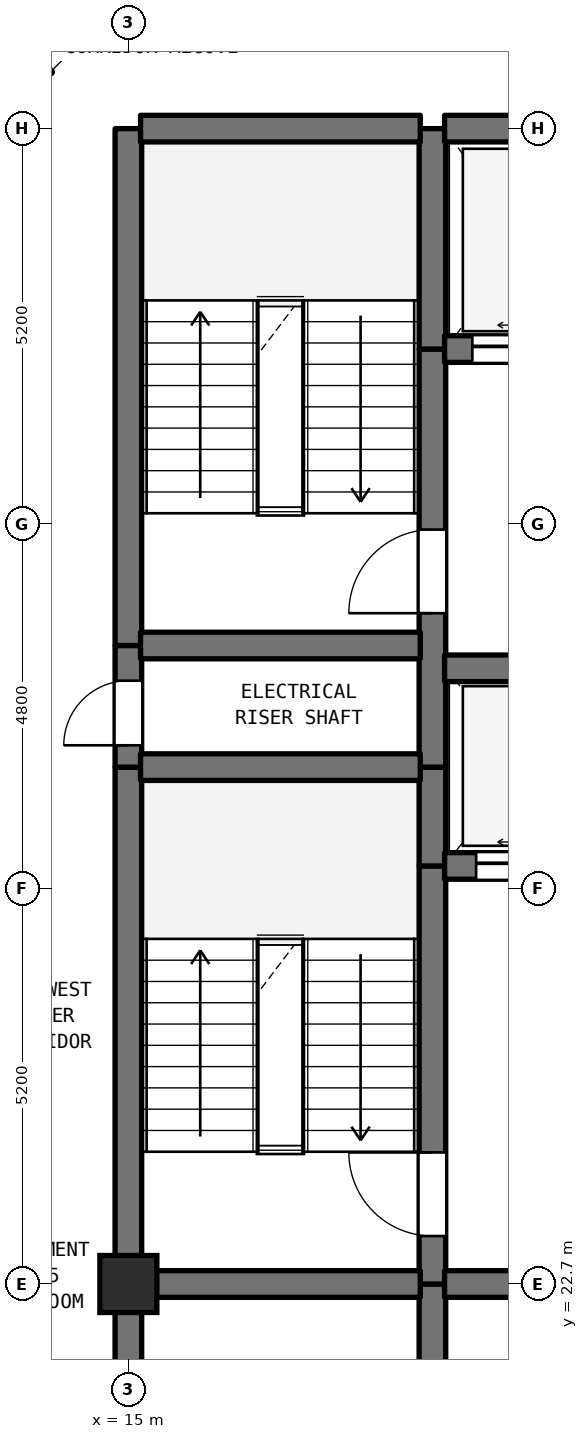
"""IFC4 building model, lengths in metres.
Left out: names, types, materials, properties, quantities, classifications, styles, units other than length and angle.
Written with IfcOpenShell. Run it as: python <this file> out.ifc"""

import sys

from ifc_helpers import new_model, si_unit, direction, frame, frame_2d, origin, origin_2d, place, context, subcontext, project, spatial, rectangle, extrude, element, fill, save


model = new_model("IFC4")
c1 = context("Model", 3, precision=1e-05, world=origin(), true_north=direction((0.0, 1.0)))
c2 = subcontext(c1, "Body", "Model", "MODEL_VIEW")
j1 = project(units=[si_unit("LENGTHUNIT", "METRE"), si_unit("PLANEANGLEUNIT", "RADIAN")], contexts=[c1])
p1 = place(None, origin())
s1 = spatial("IfcSite", under=j1, at=p1, CompositionType="ELEMENT")
p2 = place(p1, origin())
s2 = spatial("IfcBuilding", under=s1, at=p2, CompositionType="ELEMENT")
p3 = place(p2, frame((0.0, 0.0, 254.7)))
s3 = spatial("IfcBuildingStorey", under=s2, at=p3, CompositionType="ELEMENT", Elevation=254.7)
p4 = place(p3, frame((15.0, 22.7, 0.0), z_axis=(0.0, 0.0, 1.0), x_axis=(1.0, 0.0, 0.0)))
e1 = element("IfcColumn", 1, at=p4, inside=s3, PredefinedType="COLUMN", context=c2, shape_type="SweptSolid", body=[
    extrude(rectangle(XDim=0.75, YDim=0.75, at=origin_2d()), origin(), (0.0, 0.0, 1.0), 3.7),
])
p5 = place(p3, frame((15.0, 19.5, 0.0), z_axis=(0.0, 0.0, 1.0), x_axis=(0.0, 1.0, 0.0)))
e2 = element("IfcWall", 2, at=p5, inside=s3, PredefinedType="SHEAR", context=c2, shape_type="SweptSolid", body=[
    extrude(rectangle(XDim=3.2, YDim=0.35, at=frame_2d((1.6, 0.0))), origin(), (0.0, 0.0, 1.0), 3.39),
])
p6 = place(p3, frame((15.0, 22.7, 0.0), z_axis=(0.0, 0.0, 1.0), x_axis=(0.0, 1.0, 0.0)))
e3 = element("IfcWall", 3, at=p6, inside=s3, PredefinedType="SHEAR", context=c2, shape_type="SweptSolid", body=[
    extrude(rectangle(XDim=6.8, YDim=0.35, at=frame_2d((3.4, 0.0))), origin(), (0.0, 0.0, 1.0), 3.39),
])
p7 = place(p3, frame((15.0, 29.5, 0.0), z_axis=(0.0, 0.0, 1.0), x_axis=(0.0, 1.0, 0.0)))
e4 = element("IfcWall", 4, at=p7, inside=s3, PredefinedType="SHEAR", context=c2, shape_type="SweptSolid", body=[
    extrude(rectangle(XDim=1.6, YDim=0.35, at=frame_2d((0.8, 0.0))), origin(), (0.0, 0.0, 1.0), 3.39),
])
p8 = place(p7, frame((0.287, 0.0, 0.0)))
e5 = element("IfcOpeningElement", 5, at=p8, cuts=e4, PredefinedType="OPENING", context=c2, shape_type="SweptSolid", body=[
    extrude(rectangle(XDim=0.85, YDim=2.1, at=frame_2d((0.425, 1.05))), frame((0.0, 0.185, 0.0), z_axis=(0.0, -1.0, 0.0), x_axis=(1.0, 0.0, 0.0)), (0.0, 0.0, 1.0), 0.37),
])
p9 = place(p3, frame((15.0, 31.1, 0.0), z_axis=(0.0, 0.0, 1.0), x_axis=(0.0, 1.0, 0.0)))
e6 = element("IfcWall", 6, at=p9, inside=s3, PredefinedType="SHEAR", context=c2, shape_type="SweptSolid", body=[
    extrude(rectangle(XDim=6.8, YDim=0.35, at=frame_2d((3.4, 0.0))), origin(), (0.0, 0.0, 1.0), 3.39),
])
p10 = place(p3, frame((19.0, 19.5, 0.0), z_axis=(0.0, 0.0, 1.0), x_axis=(0.0, 1.0, 0.0)))
e7 = element("IfcWall", 7, at=p10, inside=s3, PredefinedType="SHEAR", context=c2, shape_type="SweptSolid", body=[
    extrude(rectangle(XDim=3.2, YDim=0.35, at=frame_2d((1.6, 0.0))), origin(), (0.0, 0.0, 1.0), 3.39),
])
p11 = place(p3, frame((19.0, 22.7, 0.0), z_axis=(0.0, 0.0, 1.0), x_axis=(0.0, 1.0, 0.0)))
e8 = element("IfcWall", 8, at=p11, inside=s3, PredefinedType="SHEAR", context=c2, shape_type="SweptSolid", body=[
    extrude(rectangle(XDim=5.5, YDim=0.35, at=frame_2d((2.75, 0.0))), origin(), (0.0, 0.0, 1.0), 3.39),
])
p12 = place(p11, frame((0.631, 0.0, 0.0)))
e9 = element("IfcOpeningElement", 9, at=p12, cuts=e8, PredefinedType="OPENING", context=c2, shape_type="SweptSolid", body=[
    extrude(rectangle(XDim=1.1, YDim=2.15, at=frame_2d((0.55, 1.075))), frame((0.0, 0.185, 0.0), z_axis=(0.0, -1.0, 0.0), x_axis=(1.0, 0.0, 0.0)), (0.0, 0.0, 1.0), 0.37),
])
p13 = place(p3, frame((19.0, 28.2, 0.0), z_axis=(0.0, 0.0, 1.0), x_axis=(0.0, 1.0, 0.0)))
e10 = element("IfcWall", 10, at=p13, inside=s3, PredefinedType="SHEAR", context=c2, shape_type="SweptSolid", body=[
    extrude(rectangle(XDim=1.3, YDim=0.35, at=frame_2d((0.65, 0.0))), origin(), (0.0, 0.0, 1.0), 3.39),
])
p14 = place(p3, frame((19.0, 29.5, 0.0), z_axis=(0.0, 0.0, 1.0), x_axis=(0.0, 1.0, 0.0)))
e11 = element("IfcWall", 11, at=p14, inside=s3, PredefinedType="SHEAR", context=c2, shape_type="SweptSolid", body=[
    extrude(rectangle(XDim=5.5, YDim=0.35, at=frame_2d((2.75, 0.0))), origin(), (0.0, 0.0, 1.0), 3.39),
])
p15 = place(p14, frame((2.025, 0.0, 0.0)))
e12 = element("IfcOpeningElement", 12, at=p15, cuts=e11, PredefinedType="OPENING", context=c2, shape_type="SweptSolid", body=[
    extrude(rectangle(XDim=1.1, YDim=2.15, at=frame_2d((0.55, 1.075))), frame((0.0, 0.185, 0.0), z_axis=(0.0, -1.0, 0.0), x_axis=(1.0, 0.0, 0.0)), (0.0, 0.0, 1.0), 0.37),
])
p16 = place(p3, frame((19.0, 35.0, 0.0), z_axis=(0.0, 0.0, 1.0), x_axis=(0.0, 1.0, 0.0)))
e13 = element("IfcWall", 13, at=p16, inside=s3, PredefinedType="SHEAR", context=c2, shape_type="SweptSolid", body=[
    extrude(rectangle(XDim=2.9, YDim=0.35, at=frame_2d((1.45, 0.0))), origin(), (0.0, 0.0, 1.0), 3.39),
])
p17 = place(p3, frame((15.16, 22.7, 0.0), z_axis=(0.0, 0.0, 1.0), x_axis=(1.0, 0.0, 0.0)))
e14 = element("IfcWall", 14, at=p17, inside=s3, PredefinedType="SHEAR", context=c2, shape_type="SweptSolid", body=[
    extrude(rectangle(XDim=3.68, YDim=0.35, at=frame_2d((1.84, 0.0))), origin(), (0.0, 0.0, 1.0), 3.39),
])
p18 = place(p3, frame((19.16, 22.7, 0.0), z_axis=(0.0, 0.0, 1.0), x_axis=(1.0, 0.0, 0.0)))
e15 = element("IfcWall", 15, at=p18, inside=s3, PredefinedType="SHEAR", context=c2, shape_type="SweptSolid", body=[
    extrude(rectangle(XDim=4.48, YDim=0.35, at=frame_2d((2.24, 0.0))), origin(), (0.0, 0.0, 1.0), 3.39),
])
p19 = place(p18, frame((1.64, 0.0, 0.0)))
e16 = element("IfcOpeningElement", 16, at=p19, cuts=e15, PredefinedType="OPENING", context=c2, shape_type="SweptSolid", body=[
    extrude(rectangle(XDim=1.2, YDim=2.2, at=frame_2d((0.6, 1.1))), frame((0.0, 0.185, 0.0), z_axis=(0.0, -1.0, 0.0), x_axis=(1.0, 0.0, 0.0)), (0.0, 0.0, 1.0), 0.37),
])
p20 = place(p3, frame((19.16, 28.2, 0.0), z_axis=(0.0, 0.0, 1.0), x_axis=(1.0, 0.0, 0.0)))
e17 = element("IfcWall", 17, at=p20, inside=s3, PredefinedType="SHEAR", context=c2, shape_type="SweptSolid", body=[
    extrude(rectangle(XDim=4.48, YDim=0.35, at=frame_2d((2.24, 0.0))), origin(), (0.0, 0.0, 1.0), 3.39),
])
p21 = place(p20, frame((0.415, 0.0, 0.0)))
e18 = element("IfcOpeningElement", 18, at=p21, cuts=e17, PredefinedType="OPENING", context=c2, shape_type="SweptSolid", body=[
    extrude(rectangle(XDim=1.25, YDim=2.2, at=frame_2d((0.625, 1.1))), frame((0.0, 0.185, 0.0), z_axis=(0.0, -1.0, 0.0), x_axis=(1.0, 0.0, 0.0)), (0.0, 0.0, 1.0), 0.37),
])
p22 = place(p20, frame((2.815, 0.0, 0.0)))
e19 = element("IfcOpeningElement", 19, at=p22, cuts=e17, PredefinedType="OPENING", context=c2, shape_type="SweptSolid", body=[
    extrude(rectangle(XDim=1.25, YDim=2.2, at=frame_2d((0.625, 1.1))), frame((0.0, 0.185, 0.0), z_axis=(0.0, -1.0, 0.0), x_axis=(1.0, 0.0, 0.0)), (0.0, 0.0, 1.0), 0.37),
])
p23 = place(p3, frame((15.16, 29.5, 0.0), z_axis=(0.0, 0.0, 1.0), x_axis=(1.0, 0.0, 0.0)))
e20 = element("IfcWall", 20, at=p23, inside=s3, PredefinedType="SHEAR", context=c2, shape_type="SweptSolid", body=[
    extrude(rectangle(XDim=3.68, YDim=0.35, at=frame_2d((1.84, 0.0))), origin(), (0.0, 0.0, 1.0), 3.39),
])
p24 = place(p3, frame((19.16, 30.8, 0.0), z_axis=(0.0, 0.0, 1.0), x_axis=(1.0, 0.0, 0.0)))
e21 = element("IfcWall", 21, at=p24, inside=s3, PredefinedType="SHEAR", context=c2, shape_type="SweptSolid", body=[
    extrude(rectangle(XDim=4.48, YDim=0.35, at=frame_2d((2.24, 0.0))), origin(), (0.0, 0.0, 1.0), 3.39),
])
p25 = place(p3, frame((15.16, 31.1, 0.0), z_axis=(0.0, 0.0, 1.0), x_axis=(1.0, 0.0, 0.0)))
e22 = element("IfcWall", 22, at=p25, inside=s3, PredefinedType="SHEAR", context=c2, shape_type="SweptSolid", body=[
    extrude(rectangle(XDim=3.68, YDim=0.35, at=frame_2d((1.84, 0.0))), origin(), (0.0, 0.0, 1.0), 3.39),
])
p26 = place(p3, frame((19.16, 35.0, 0.0), z_axis=(0.0, 0.0, 1.0), x_axis=(1.0, 0.0, 0.0)))
e23 = element("IfcWall", 23, at=p26, inside=s3, PredefinedType="SHEAR", context=c2, shape_type="SweptSolid", body=[
    extrude(rectangle(XDim=4.48, YDim=0.35, at=frame_2d((2.24, 0.0))), origin(), (0.0, 0.0, 1.0), 3.39),
])
p27 = place(p26, frame((0.365, 0.0, 0.0)))
e24 = element("IfcOpeningElement", 24, at=p27, cuts=e23, PredefinedType="OPENING", context=c2, shape_type="SweptSolid", body=[
    extrude(rectangle(XDim=1.35, YDim=2.2, at=frame_2d((0.675, 1.1))), frame((0.0, 0.185, 0.0), z_axis=(0.0, -1.0, 0.0), x_axis=(1.0, 0.0, 0.0)), (0.0, 0.0, 1.0), 0.37),
])
p28 = place(p26, frame((2.765, 0.0, 0.0)))
e25 = element("IfcOpeningElement", 25, at=p28, cuts=e23, PredefinedType="OPENING", context=c2, shape_type="SweptSolid", body=[
    extrude(rectangle(XDim=1.35, YDim=2.2, at=frame_2d((0.675, 1.1))), frame((0.0, 0.185, 0.0), z_axis=(0.0, -1.0, 0.0), x_axis=(1.0, 0.0, 0.0)), (0.0, 0.0, 1.0), 0.37),
])
p29 = place(p3, frame((15.16, 37.9, 0.0), z_axis=(0.0, 0.0, 1.0), x_axis=(1.0, 0.0, 0.0)))
e26 = element("IfcWall", 26, at=p29, inside=s3, PredefinedType="SHEAR", context=c2, shape_type="SweptSolid", body=[
    extrude(rectangle(XDim=3.68, YDim=0.35, at=frame_2d((1.84, 0.0))), origin(), (0.0, 0.0, 1.0), 3.39),
])
p30 = place(p3, frame((19.16, 37.9, 0.0), z_axis=(0.0, 0.0, 1.0), x_axis=(1.0, 0.0, 0.0)))
e27 = element("IfcWall", 27, at=p30, inside=s3, PredefinedType="SHEAR", context=c2, shape_type="SweptSolid", body=[
    extrude(rectangle(XDim=4.48, YDim=0.35, at=frame_2d((2.24, 0.0))), origin(), (0.0, 0.0, 1.0), 3.39),
])
p31 = place(p8, origin())
e28 = element("IfcDoor", 28, at=p31, inside=s3, OperationType="SINGLE_SWING_LEFT", PredefinedType="DOOR", context=c2, shape_type="SweptSolid", body=[
    extrude(rectangle(XDim=0.85, YDim=2.1, at=frame_2d((0.425, 1.05))), frame((0.0, 0.025, 0.0), z_axis=(0.0, -1.0, 0.0), x_axis=(1.0, 0.0, 0.0)), (0.0, 0.0, 1.0), 0.05),
])
fill(e5, e28)
p32 = place(p12, origin())
e29 = element("IfcDoor", 29, at=p32, inside=s3, OperationType="SINGLE_SWING_RIGHT", PredefinedType="DOOR", context=c2, shape_type="SweptSolid", body=[
    extrude(rectangle(XDim=1.1, YDim=2.15, at=frame_2d((0.55, 1.075))), frame((0.0, 0.025, 0.0), z_axis=(0.0, -1.0, 0.0), x_axis=(1.0, 0.0, 0.0)), (0.0, 0.0, 1.0), 0.05),
])
fill(e9, e29)
p33 = place(p15, origin())
e30 = element("IfcDoor", 30, at=p33, inside=s3, OperationType="SINGLE_SWING_LEFT", PredefinedType="DOOR", context=c2, shape_type="SweptSolid", body=[
    extrude(rectangle(XDim=1.1, YDim=2.15, at=frame_2d((0.55, 1.075))), frame((0.0, 0.025, 0.0), z_axis=(0.0, -1.0, 0.0), x_axis=(1.0, 0.0, 0.0)), (0.0, 0.0, 1.0), 0.05),
])
fill(e12, e30)
p34 = place(p21, origin())
e31 = element("IfcDoor", 31, at=p34, inside=s3, OperationType="DOUBLE_DOOR_SLIDING", PredefinedType="DOOR", context=c2, shape_type="SweptSolid", body=[
    extrude(rectangle(XDim=1.25, YDim=2.2, at=frame_2d((0.625, 1.1))), frame((0.0, 0.025, 0.0), z_axis=(0.0, -1.0, 0.0), x_axis=(1.0, 0.0, 0.0)), (0.0, 0.0, 1.0), 0.05),
])
fill(e18, e31)
p35 = place(p27, origin())
e32 = element("IfcDoor", 32, at=p35, inside=s3, OperationType="DOUBLE_DOOR_SLIDING", PredefinedType="DOOR", context=c2, shape_type="SweptSolid", body=[
    extrude(rectangle(XDim=1.35, YDim=2.2, at=frame_2d((0.675, 1.1))), frame((0.0, 0.025, 0.0), z_axis=(0.0, -1.0, 0.0), x_axis=(1.0, 0.0, 0.0)), (0.0, 0.0, 1.0), 0.05),
])
fill(e24, e32)
save(model, sys.argv[1])
